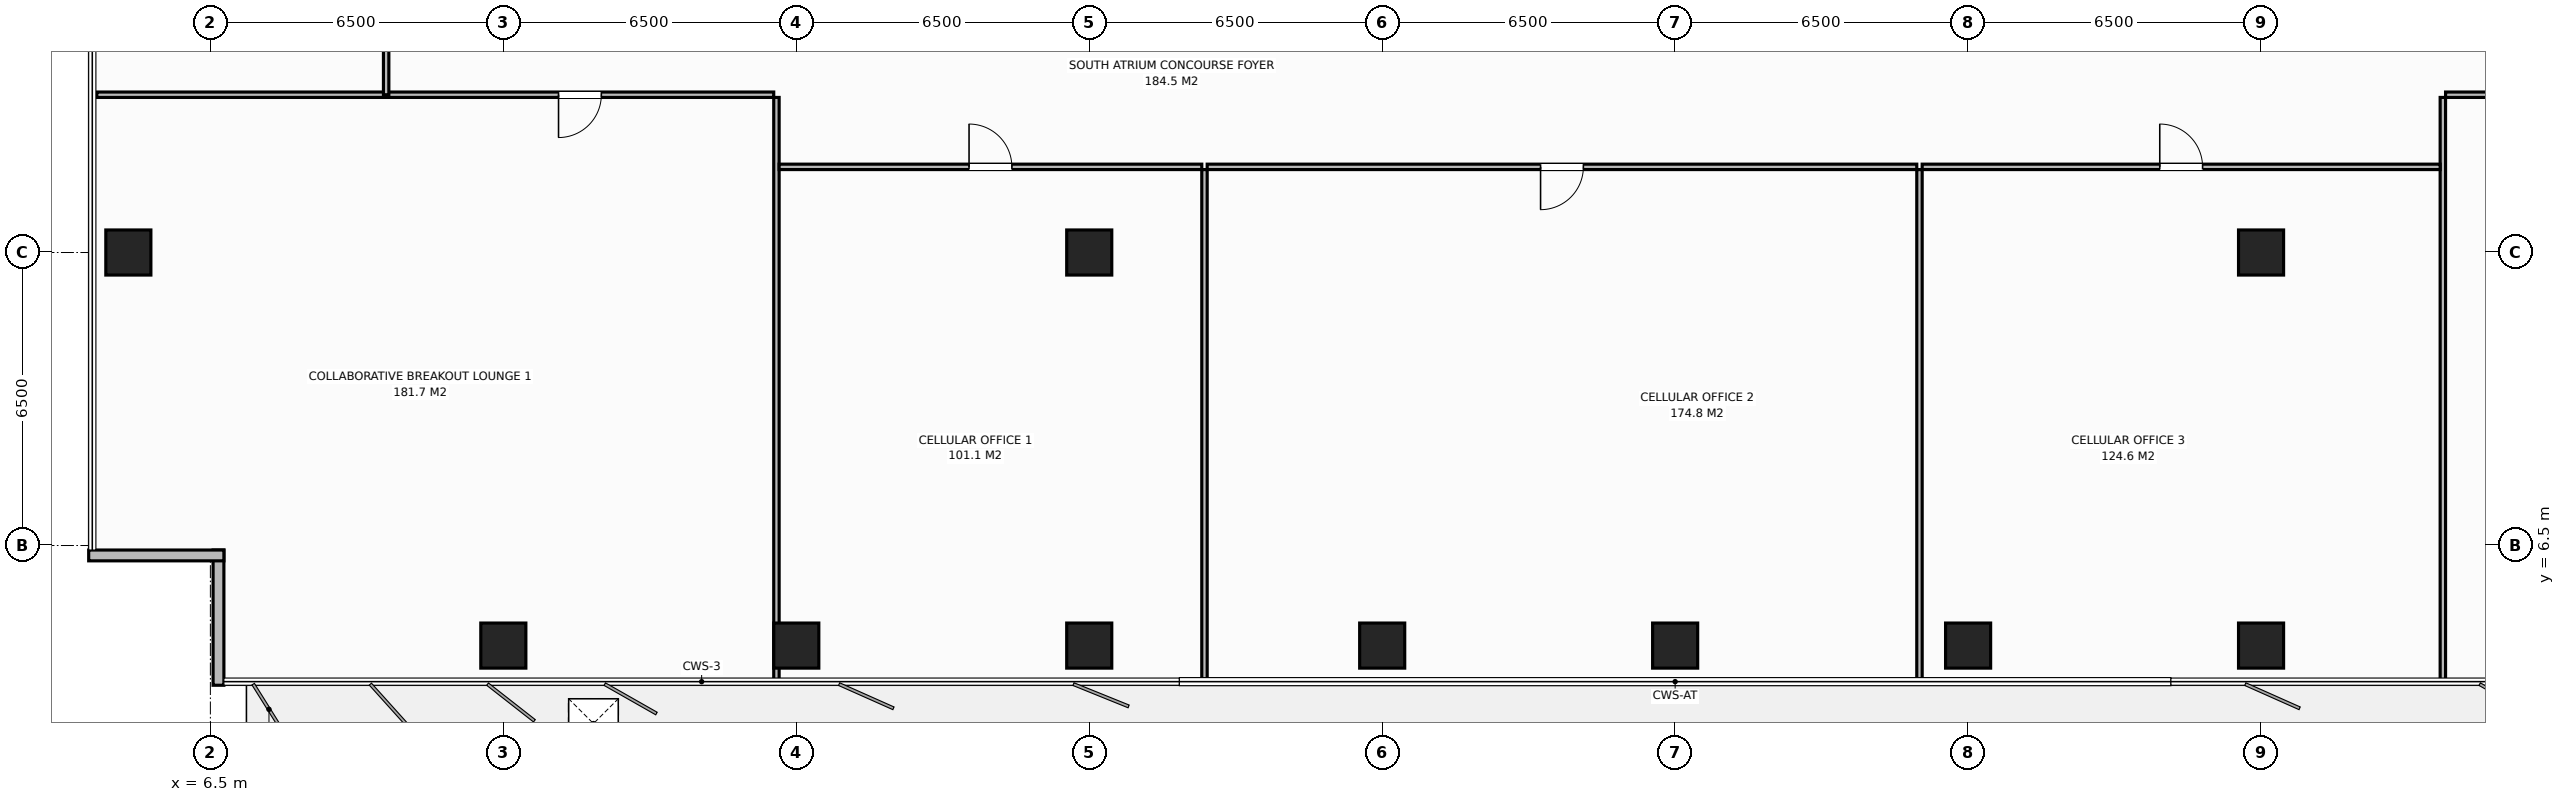
"""IFC4 building model, lengths in metres.
Left out: names, types, materials, properties, quantities, classifications, styles, units other than length and angle.
Written with IfcOpenShell. Run it as: python <this file> out.ifc"""

import sys

from ifc_helpers import new_model, si_unit, direction, frame, frame_2d, origin, origin_2d, place, context, subcontext, project, spatial, rectangle, extrude, element, fill, save


model = new_model("IFC4")
c1 = context("Model", 3, precision=1e-05, world=origin(), true_north=direction((0.0, 1.0)))
c2 = subcontext(c1, "Body", "Model", "MODEL_VIEW")
j1 = project(units=[si_unit("LENGTHUNIT", "METRE"), si_unit("PLANEANGLEUNIT", "RADIAN")], contexts=[c1])
p1 = place(None, origin())
s1 = spatial("IfcSite", under=j1, at=p1, CompositionType="ELEMENT")
p2 = place(p1, origin())
s2 = spatial("IfcBuilding", under=s1, at=p2, CompositionType="ELEMENT")
p3 = place(p2, frame((0.0, 0.0, 144.2)))
s3 = spatial("IfcBuildingStorey", under=s2, at=p3, CompositionType="ELEMENT", Elevation=144.2)
for number, where, z_axis, x_axis in (
    (1, (26.0, 13.0, 0.0), (0.0, 0.0, 1.0), (1.0, 0.0, 0.0)),
    (2, (52.0, 13.0, 0.0), (0.0, 0.0, 1.0), (1.0, 0.0, 0.0)),
    (3, (13.0, 4.28, 0.0), (0.0, 0.0, 1.0), (1.0, 0.0, 0.0)),
    (4, (19.5, 4.28, 0.0), (0.0, 0.0, 1.0), (1.0, 0.0, 0.0)),
    (5, (26.0, 4.28, 0.0), (0.0, 0.0, 1.0), (1.0, 0.0, 0.0)),
    (6, (32.5, 4.28, 0.0), (0.0, 0.0, 1.0), (1.0, 0.0, 0.0)),
    (7, (39.0, 4.28, 0.0), (0.0, 0.0, 1.0), (1.0, 0.0, 0.0)),
    (8, (45.5, 4.28, 0.0), (0.0, 0.0, 1.0), (1.0, 0.0, 0.0)),
    (9, (52.0, 4.28, 0.0), (0.0, 0.0, 1.0), (1.0, 0.0, 0.0)),
    (10, (4.68, 13.0, 0.0), (0.0, 0.0, 1.0), (1.0, 0.0, 0.0)),
):
    element("IfcColumn", number, at=place(p3, frame(where, z_axis=z_axis, x_axis=x_axis)), inside=s3, PredefinedType="COLUMN", context=c2, shape_type="SweptSolid", body=[
        extrude(rectangle(XDim=1.0, YDim=1.0, at=origin_2d()), origin(), (0.0, 0.0, 1.0), 3.8),
    ])
for number, where, z_axis, x_axis in (
    (11, (6.68, 3.4, 0.0), (0.0, 0.0, 1.0), (0.0, 1.0, 0.0)),
    (12, (6.8, 6.28, 0.0), (0.0, 0.0, 1.0), (-1.0, 0.0, 0.0)),
):
    element("IfcWall", number, at=place(p3, frame(where, z_axis=z_axis, x_axis=x_axis)), inside=s3, PredefinedType="STANDARD", context=c2, shape_type="SweptSolid", body=[
        extrude(rectangle(XDim=3.0, YDim=0.24, at=frame_2d((1.5, 0.0))), origin(), (0.0, 0.0, 1.0), 3.572),
    ])
p4 = place(p3, frame((19.06, 3.42, 0.0), z_axis=(0.0, 0.0, 1.0), x_axis=(0.0, 1.0, 0.0)))
e13 = element("IfcWall", 13, at=p4, inside=s3, PredefinedType="PARTITIONING", context=c2, shape_type="SweptSolid", body=[
    extrude(rectangle(XDim=13.02, YDim=0.12, at=frame_2d((6.51, 0.0))), origin(), (0.0, 0.0, 1.0), 3.572),
])
p5 = place(p3, frame((3.98, 16.5, 0.0), z_axis=(0.0, 0.0, 1.0), x_axis=(1.0, 0.0, 0.0)))
e14 = element("IfcWall", 14, at=p5, inside=s3, PredefinedType="PARTITIONING", context=c2, shape_type="SweptSolid", body=[
    extrude(rectangle(XDim=15.02, YDim=0.12, at=frame_2d((7.51, 0.0))), origin(), (0.0, 0.0, 1.0), 3.572),
])
p6 = place(p5, frame((10.245, 0.0, 0.0)))
e15 = element("IfcOpeningElement", 15, at=p6, cuts=e14, PredefinedType="OPENING", context=c2, shape_type="SweptSolid", body=[
    extrude(rectangle(XDim=0.95, YDim=2.15, at=frame_2d((0.475, 1.075))), frame((0.0, 0.07, 0.0), z_axis=(0.0, -1.0, 0.0), x_axis=(1.0, 0.0, 0.0)), (0.0, 0.0, 1.0), 0.14),
])
p7 = place(p3, frame((28.557, 3.42, 0.0), z_axis=(0.0, 0.0, 1.0), x_axis=(0.0, 1.0, 0.0)))
e16 = element("IfcWall", 16, at=p7, inside=s3, PredefinedType="PARTITIONING", context=c2, shape_type="SweptSolid", body=[
    extrude(rectangle(XDim=11.42, YDim=0.12, at=frame_2d((5.71, 0.0))), origin(), (0.0, 0.0, 1.0), 3.572),
])
p8 = place(p3, frame((19.12, 14.9, 0.0), z_axis=(0.0, 0.0, 1.0), x_axis=(1.0, 0.0, 0.0)))
e17 = element("IfcWall", 17, at=p8, inside=s3, PredefinedType="PARTITIONING", context=c2, shape_type="SweptSolid", body=[
    extrude(rectangle(XDim=9.377, YDim=0.12, at=frame_2d((4.689, 0.0))), origin(), (0.0, 0.0, 1.0), 3.572),
])
p9 = place(p8, frame((4.214, 0.0, 0.0)))
e18 = element("IfcOpeningElement", 18, at=p9, cuts=e17, PredefinedType="OPENING", context=c2, shape_type="SweptSolid", body=[
    extrude(rectangle(XDim=0.95, YDim=2.15, at=frame_2d((0.475, 1.075))), frame((0.0, 0.07, 0.0), z_axis=(0.0, -1.0, 0.0), x_axis=(1.0, 0.0, 0.0)), (0.0, 0.0, 1.0), 0.14),
])
p10 = place(p3, frame((44.421, 3.42, 0.0), z_axis=(0.0, 0.0, 1.0), x_axis=(0.0, 1.0, 0.0)))
e19 = element("IfcWall", 19, at=p10, inside=s3, PredefinedType="PARTITIONING", context=c2, shape_type="SweptSolid", body=[
    extrude(rectangle(XDim=11.42, YDim=0.12, at=frame_2d((5.71, 0.0))), origin(), (0.0, 0.0, 1.0), 3.572),
])
p11 = place(p3, frame((28.617, 14.9, 0.0), z_axis=(0.0, 0.0, 1.0), x_axis=(1.0, 0.0, 0.0)))
e20 = element("IfcWall", 20, at=p11, inside=s3, PredefinedType="PARTITIONING", context=c2, shape_type="SweptSolid", body=[
    extrude(rectangle(XDim=15.744, YDim=0.12, at=frame_2d((7.872, 0.0))), origin(), (0.0, 0.0, 1.0), 3.572),
])
p12 = place(p11, frame((7.397, 0.0, 0.0)))
e21 = element("IfcOpeningElement", 21, at=p12, cuts=e20, PredefinedType="OPENING", context=c2, shape_type="SweptSolid", body=[
    extrude(rectangle(XDim=0.95, YDim=2.15, at=frame_2d((0.475, 1.075))), frame((0.0, 0.07, 0.0), z_axis=(0.0, -1.0, 0.0), x_axis=(1.0, 0.0, 0.0)), (0.0, 0.0, 1.0), 0.14),
])
p13 = place(p3, frame((56.034, 3.42, 0.0), z_axis=(0.0, 0.0, 1.0), x_axis=(0.0, 1.0, 0.0)))
e22 = element("IfcWall", 22, at=p13, inside=s3, PredefinedType="PARTITIONING", context=c2, shape_type="SweptSolid", body=[
    extrude(rectangle(XDim=13.02, YDim=0.12, at=frame_2d((6.51, 0.0))), origin(), (0.0, 0.0, 1.0), 3.572),
])
p14 = place(p3, frame((44.481, 14.9, 0.0), z_axis=(0.0, 0.0, 1.0), x_axis=(1.0, 0.0, 0.0)))
e23 = element("IfcWall", 23, at=p14, inside=s3, PredefinedType="PARTITIONING", context=c2, shape_type="SweptSolid", body=[
    extrude(rectangle(XDim=11.492, YDim=0.12, at=frame_2d((5.746, 0.0))), origin(), (0.0, 0.0, 1.0), 3.572),
])
p15 = place(p14, frame((5.271, 0.0, 0.0)))
e24 = element("IfcOpeningElement", 24, at=p15, cuts=e23, PredefinedType="OPENING", context=c2, shape_type="SweptSolid", body=[
    extrude(rectangle(XDim=0.95, YDim=2.15, at=frame_2d((0.475, 1.075))), frame((0.0, 0.07, 0.0), z_axis=(0.0, -1.0, 0.0), x_axis=(1.0, 0.0, 0.0)), (0.0, 0.0, 1.0), 0.14),
])
p16 = place(p3, frame((56.094, 16.5, 0.0), z_axis=(0.0, 0.0, 1.0), x_axis=(1.0, 0.0, 0.0)))
e25 = element("IfcWall", 25, at=p16, inside=s3, PredefinedType="PARTITIONING", context=c2, shape_type="SweptSolid", body=[
    extrude(rectangle(XDim=17.926, YDim=0.12, at=frame_2d((8.963, 0.0))), origin(), (0.0, 0.0, 1.0), 3.572),
])
p17 = place(p16, frame((5.278, 0.0, 0.0)))
e26 = element("IfcOpeningElement", 26, at=p17, cuts=e25, PredefinedType="OPENING", context=c2, shape_type="SweptSolid", body=[
    extrude(rectangle(XDim=0.95, YDim=2.15, at=frame_2d((0.475, 1.075))), frame((0.0, 0.07, 0.0), z_axis=(0.0, -1.0, 0.0), x_axis=(1.0, 0.0, 0.0)), (0.0, 0.0, 1.0), 0.14),
])
p18 = place(p3, frame((10.4, 16.5, 0.0), z_axis=(0.0, 0.0, 1.0), x_axis=(0.0, 1.0, 0.0)))
e27 = element("IfcWall", 27, at=p18, inside=s3, PredefinedType="PARTITIONING", context=c2, shape_type="SweptSolid", body=[
    extrude(rectangle(XDim=9.5, YDim=0.12, at=frame_2d((4.75, 0.0))), origin(), (0.0, 0.0, 1.0), 3.572),
])
p19 = place(p18, frame((5.325, 0.0, 0.0)))
e28 = element("IfcOpeningElement", 28, at=p19, cuts=e27, PredefinedType="OPENING", context=c2, shape_type="SweptSolid", body=[
    extrude(rectangle(XDim=0.95, YDim=2.15, at=frame_2d((0.475, 1.075))), frame((0.0, 0.07, 0.0), z_axis=(0.0, -1.0, 0.0), x_axis=(1.0, 0.0, 0.0)), (0.0, 0.0, 1.0), 0.14),
])
p20 = place(p3, frame((0.0, 0.0, -0.21)))
p21 = place(p20, frame((15.0, 2.55, 0.0)))
p22 = place(p21, frame((0.0, 0.0, 0.21)))
e29 = element("IfcDoor", 29, at=p22, inside=s3, OperationType="SINGLE_SWING_LEFT", PredefinedType="TRAPDOOR", context=c2, shape_type="SweptSolid", body=[
    extrude(rectangle(XDim=1.1, YDim=1.1, at=origin_2d()), origin(), (0.0, 0.0, 1.0), 0.05),
])
p23 = place(p6, origin())
e30 = element("IfcDoor", 30, at=p23, inside=s3, OperationType="SINGLE_SWING_RIGHT", PredefinedType="DOOR", context=c2, shape_type="SweptSolid", body=[
    extrude(rectangle(XDim=0.95, YDim=2.15, at=frame_2d((0.475, 1.075))), frame((0.0, 0.025, 0.0), z_axis=(0.0, -1.0, 0.0), x_axis=(1.0, 0.0, 0.0)), (0.0, 0.0, 1.0), 0.05),
])
fill(e15, e30)
p24 = place(p9, origin())
e31 = element("IfcDoor", 31, at=p24, inside=s3, OperationType="SINGLE_SWING_LEFT", PredefinedType="DOOR", context=c2, shape_type="SweptSolid", body=[
    extrude(rectangle(XDim=0.95, YDim=2.15, at=frame_2d((0.475, 1.075))), frame((0.0, 0.025, 0.0), z_axis=(0.0, -1.0, 0.0), x_axis=(1.0, 0.0, 0.0)), (0.0, 0.0, 1.0), 0.05),
])
fill(e18, e31)
p25 = place(p12, origin())
e32 = element("IfcDoor", 32, at=p25, inside=s3, OperationType="SINGLE_SWING_RIGHT", PredefinedType="DOOR", context=c2, shape_type="SweptSolid", body=[
    extrude(rectangle(XDim=0.95, YDim=2.15, at=frame_2d((0.475, 1.075))), frame((0.0, 0.025, 0.0), z_axis=(0.0, -1.0, 0.0), x_axis=(1.0, 0.0, 0.0)), (0.0, 0.0, 1.0), 0.05),
])
fill(e21, e32)
p26 = place(p15, origin())
e33 = element("IfcDoor", 33, at=p26, inside=s3, OperationType="SINGLE_SWING_LEFT", PredefinedType="DOOR", context=c2, shape_type="SweptSolid", body=[
    extrude(rectangle(XDim=0.95, YDim=2.15, at=frame_2d((0.475, 1.075))), frame((0.0, 0.025, 0.0), z_axis=(0.0, -1.0, 0.0), x_axis=(1.0, 0.0, 0.0)), (0.0, 0.0, 1.0), 0.05),
])
fill(e24, e33)
save(model, sys.argv[1])
